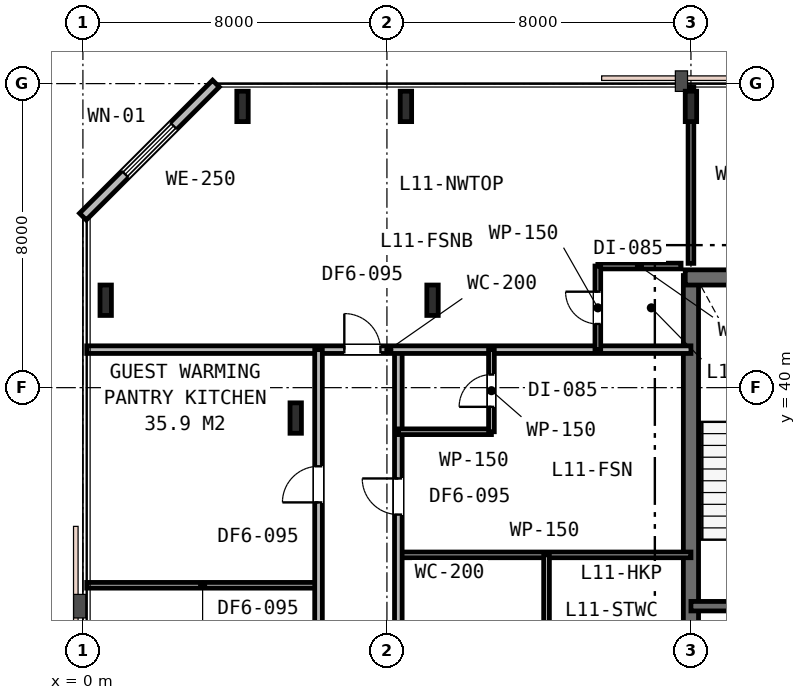
"""IFC4 building model, lengths in metres.
Left out: names, types, materials, properties, quantities, classifications, styles, units other than length and angle.
Written with IfcOpenShell. Run it as: python <this file> out.ifc"""

import sys

from ifc_helpers import new_model, si_unit, direction, frame, frame_2d, origin, origin_2d, place, context, subcontext, project, spatial, rectangle, i_section, extrude, element, fill, save


model = new_model("IFC4")
c1 = context("Model", 3, precision=1e-05, world=origin(), true_north=direction((0.0, 1.0)))
c2 = subcontext(c1, "Body", "Model", "MODEL_VIEW")
j1 = project(units=[si_unit("LENGTHUNIT", "METRE"), si_unit("PLANEANGLEUNIT", "RADIAN")], contexts=[c1])
p1 = place(None, origin())
s1 = spatial("IfcSite", under=j1, at=p1, CompositionType="ELEMENT")
p2 = place(p1, origin())
s2 = spatial("IfcBuilding", under=s1, at=p2, CompositionType="ELEMENT")
p3 = place(p2, frame((0.0, 0.0, 47.4)))
s3 = spatial("IfcBuildingStorey", under=s2, at=p3, CompositionType="ELEMENT", Elevation=47.4)
p4 = place(p3, frame((16.0, 30.65, 0.0), z_axis=(0.0, 0.0, 1.0), x_axis=(0.0, 1.0, 0.0)))
e1 = element("IfcWall", 1, at=p4, inside=s3, PredefinedType="SHEAR", context=c2, shape_type="SweptSolid", body=[
    extrude(rectangle(XDim=12.3, YDim=0.4, at=frame_2d((6.15, 0.0))), origin(), (0.0, 0.0, 1.0), 3.6),
])
p5 = place(p3, frame((15.85, 42.9, 0.0), z_axis=(0.0, 0.0, 1.0), x_axis=(1.0, 0.0, 0.0)))
e2 = element("IfcWall", 2, at=p5, inside=s3, PredefinedType="SHEAR", context=c2, shape_type="SweptSolid", body=[
    extrude(rectangle(XDim=24.3, YDim=0.4, at=frame_2d((12.15, 0.0))), origin(), (0.0, 0.0, 1.0), 3.6),
])
p6 = place(p3, frame((16.0, 34.25, 0.0), z_axis=(0.0, 0.0, 1.0), x_axis=(1.0, 0.0, 0.0)))
e3 = element("IfcWall", 3, at=p6, inside=s3, PredefinedType="SHEAR", context=c2, shape_type="SweptSolid", body=[
    extrude(rectangle(XDim=6.05, YDim=0.25, at=frame_2d((3.025, 0.0))), origin(), (0.0, 0.0, 1.0), 3.6),
])
p7 = place(p6, frame((1.25, 0.0, 0.0)))
e4 = element("IfcOpeningElement", 4, at=p7, cuts=e3, PredefinedType="OPENING", context=c2, shape_type="SweptSolid", body=[
    extrude(rectangle(XDim=1.0, YDim=2.15, at=frame_2d((0.5, 1.075))), frame((0.0, 0.135, 0.0), z_axis=(0.0, -1.0, 0.0), x_axis=(1.0, 0.0, 0.0)), (0.0, 0.0, 1.0), 0.27),
])
p8 = place(p6, frame((4.2, 0.0, 0.0)))
e5 = element("IfcOpeningElement", 5, at=p8, cuts=e3, PredefinedType="OPENING", context=c2, shape_type="SweptSolid", body=[
    extrude(rectangle(XDim=1.1, YDim=2.15, at=frame_2d((0.55, 1.075))), frame((0.0, 0.135, 0.0), z_axis=(0.0, -1.0, 0.0), x_axis=(1.0, 0.0, 0.0)), (0.0, 0.0, 1.0), 0.27),
])
for number, where, z_axis, x_axis in (
    (6, (5.6, 39.2, 0.0), (0.0, 0.0, 1.0), (1.0, 0.0, 0.0)),
    (7, (9.2, 42.3, 0.0), (0.0, 0.0, 1.0), (1.0, 0.0, 0.0)),
    (8, (0.6, 42.3, 0.0), (0.0, 0.0, 1.0), (1.0, 0.0, 0.0)),
    (9, (4.2, 47.4, 0.0), (0.0, 0.0, 1.0), (1.0, 0.0, 0.0)),
    (10, (8.5, 47.4, 0.0), (0.0, 0.0, 1.0), (1.0, 0.0, 0.0)),
    (11, (16.0, 47.4, 0.0), (0.0, 0.0, 1.0), (1.0, 0.0, 0.0)),
):
    element("IfcColumn", number, at=place(p3, frame(where, z_axis=z_axis, x_axis=x_axis)), inside=s3, PredefinedType="COLUMN", context=c2, shape_type="SweptSolid", body=[
        extrude(i_section(OverallWidth=0.3, OverallDepth=0.8, WebThickness=0.018, FlangeThickness=0.033, FilletRadius=0.03, at=origin_2d()), origin(), (0.0, 0.0, 1.0), 3.6),
    ])
p9 = place(p3, frame((3.5, 48.0, 0.0), z_axis=(0.0, 0.0, 1.0), x_axis=(-0.707106781187, -0.707106781187, 0.0)))
e12 = element("IfcWall", 12, at=p9, inside=s3, PredefinedType="STANDARD", context=c2, shape_type="SweptSolid", body=[
    extrude(rectangle(XDim=4.95, YDim=0.25, at=frame_2d((2.475, 0.0))), origin(), (0.0, 0.0, 1.0), 3.33),
])
p10 = place(p9, frame((1.575, 0.0, 0.75)))
e13 = element("IfcOpeningElement", 13, at=p10, cuts=e12, PredefinedType="OPENING", context=c2, shape_type="SweptSolid", body=[
    extrude(rectangle(XDim=1.8, YDim=1.85, at=frame_2d((0.9, 0.925))), frame((0.0, 0.135, 0.0), z_axis=(0.0, -1.0, 0.0), x_axis=(1.0, 0.0, 0.0)), (0.0, 0.0, 1.0), 0.27),
])
p11 = place(p3, frame((8.3, 35.6, 0.0), z_axis=(0.0, 0.0, 1.0), x_axis=(1.0, 0.0, 0.0)))
e14 = element("IfcWall", 14, at=p11, inside=s3, PredefinedType="PARTITIONING", context=c2, shape_type="SweptSolid", body=[
    extrude(rectangle(XDim=7.7, YDim=0.15, at=frame_2d((3.85, 0.0))), origin(), (0.0, 0.0, 1.0), 2.82),
])
p12 = place(p3, frame((12.2, 30.8, 0.0), z_axis=(0.0, 0.0, 1.0), x_axis=(0.0, 1.0, 0.0)))
e15 = element("IfcWall", 15, at=p12, inside=s3, PredefinedType="PARTITIONING", context=c2, shape_type="SweptSolid", body=[
    extrude(rectangle(XDim=4.8, YDim=0.15, at=frame_2d((2.4, 0.0))), origin(), (0.0, 0.0, 1.0), 2.82),
])
p13 = place(p3, frame((8.3, 30.8, 0.0), z_axis=(0.0, 0.0, 1.0), x_axis=(0.0, 1.0, 0.0)))
e16 = element("IfcWall", 16, at=p13, inside=s3, PredefinedType="PARTITIONING", context=c2, shape_type="SweptSolid", body=[
    extrude(rectangle(XDim=10.2, YDim=0.2, at=frame_2d((5.1, 0.0))), origin(), (0.0, 0.0, 1.0), 2.82),
])
p14 = place(p13, frame((1.95, 0.0, 0.0)))
e17 = element("IfcOpeningElement", 17, at=p14, cuts=e16, PredefinedType="OPENING", context=c2, shape_type="SweptSolid", body=[
    extrude(rectangle(XDim=0.9, YDim=2.15, at=frame_2d((0.45, 1.075))), frame((0.0, 0.11, 0.0), z_axis=(0.0, -1.0, 0.0), x_axis=(1.0, 0.0, 0.0)), (0.0, 0.0, 1.0), 0.22),
])
p15 = place(p13, frame((5.861, 0.0, 0.0)))
e18 = element("IfcOpeningElement", 18, at=p15, cuts=e16, PredefinedType="OPENING", context=c2, shape_type="SweptSolid", body=[
    extrude(rectangle(XDim=0.95, YDim=2.15, at=frame_2d((0.475, 1.075))), frame((0.0, 0.11, 0.0), z_axis=(0.0, -1.0, 0.0), x_axis=(1.0, 0.0, 0.0)), (0.0, 0.0, 1.0), 0.22),
])
p16 = place(p3, frame((0.1, 41.0, 0.0), z_axis=(0.0, 0.0, 1.0), x_axis=(1.0, 0.0, 0.0)))
e19 = element("IfcWall", 19, at=p16, inside=s3, PredefinedType="PARTITIONING", context=c2, shape_type="SweptSolid", body=[
    extrude(rectangle(XDim=15.9, YDim=0.2, at=frame_2d((7.95, 0.0))), origin(), (0.0, 0.0, 1.0), 2.82),
])
p17 = place(p16, frame((6.779, 0.0, 0.0)))
e20 = element("IfcOpeningElement", 20, at=p17, cuts=e19, PredefinedType="OPENING", context=c2, shape_type="SweptSolid", body=[
    extrude(rectangle(XDim=0.95, YDim=2.15, at=frame_2d((0.475, 1.075))), frame((0.0, 0.11, 0.0), z_axis=(0.0, -1.0, 0.0), x_axis=(1.0, 0.0, 0.0)), (0.0, 0.0, 1.0), 0.22),
])
p18 = place(p3, frame((13.55, 43.2, 0.0), z_axis=(0.0, 0.0, 1.0), x_axis=(1.0, 0.0, 0.0)))
e21 = element("IfcWall", 21, at=p18, inside=s3, PredefinedType="PARTITIONING", context=c2, shape_type="SweptSolid", body=[
    extrude(rectangle(XDim=2.19, YDim=0.15, at=frame_2d((1.095, 0.0))), origin(), (0.0, 0.0, 1.0), 3.33),
])
p19 = place(p3, frame((13.55, 41.0, 0.0), z_axis=(0.0, 0.0, 1.0), x_axis=(0.0, 1.0, 0.0)))
e22 = element("IfcWall", 22, at=p19, inside=s3, PredefinedType="PARTITIONING", context=c2, shape_type="SweptSolid", body=[
    extrude(rectangle(XDim=2.2, YDim=0.15, at=frame_2d((1.1, 0.0))), origin(), (0.0, 0.0, 1.0), 3.33),
])
p20 = place(p19, frame((0.675, 0.0, 0.0)))
e23 = element("IfcOpeningElement", 23, at=p20, cuts=e22, PredefinedType="OPENING", context=c2, shape_type="SweptSolid", body=[
    extrude(rectangle(XDim=0.85, YDim=2.15, at=frame_2d((0.425, 1.075))), frame((0.0, 0.085, 0.0), z_axis=(0.0, -1.0, 0.0), x_axis=(1.0, 0.0, 0.0)), (0.0, 0.0, 1.0), 0.17),
])
p21 = place(p3, frame((0.1, 34.8, 0.0), z_axis=(0.0, 0.0, 1.0), x_axis=(1.0, 0.0, 0.0)))
e24 = element("IfcWall", 24, at=p21, inside=s3, PredefinedType="PARTITIONING", context=c2, shape_type="SweptSolid", body=[
    extrude(rectangle(XDim=6.1, YDim=0.15, at=frame_2d((3.05, 0.0))), origin(), (0.0, 0.0, 1.0), 2.82),
])
p22 = place(p3, frame((6.2, 28.6, 0.0), z_axis=(0.0, 0.0, 1.0), x_axis=(0.0, 1.0, 0.0)))
e25 = element("IfcWall", 25, at=p22, inside=s3, PredefinedType="PARTITIONING", context=c2, shape_type="SweptSolid", body=[
    extrude(rectangle(XDim=12.4, YDim=0.2, at=frame_2d((6.2, 0.0))), origin(), (0.0, 0.0, 1.0), 2.82),
])
p23 = place(p22, frame((3.725, 0.0, 0.0)))
e26 = element("IfcOpeningElement", 26, at=p23, cuts=e25, PredefinedType="OPENING", context=c2, shape_type="SweptSolid", body=[
    extrude(rectangle(XDim=0.95, YDim=2.15, at=frame_2d((0.475, 1.075))), frame((0.0, 0.11, 0.0), z_axis=(0.0, -1.0, 0.0), x_axis=(1.0, 0.0, 0.0)), (0.0, 0.0, 1.0), 0.22),
])
p24 = place(p22, frame((8.381, 0.0, 0.0)))
e27 = element("IfcOpeningElement", 27, at=p24, cuts=e25, PredefinedType="OPENING", context=c2, shape_type="SweptSolid", body=[
    extrude(rectangle(XDim=0.95, YDim=2.15, at=frame_2d((0.475, 1.075))), frame((0.0, 0.11, 0.0), z_axis=(0.0, -1.0, 0.0), x_axis=(1.0, 0.0, 0.0)), (0.0, 0.0, 1.0), 0.22),
])
p25 = place(p3, frame((8.3, 38.84, 0.0), z_axis=(0.0, 0.0, 1.0), x_axis=(1.0, 0.0, 0.0)))
e28 = element("IfcWall", 28, at=p25, inside=s3, PredefinedType="PARTITIONING", context=c2, shape_type="SweptSolid", body=[
    extrude(rectangle(XDim=2.45, YDim=0.15, at=frame_2d((1.225, 0.0))), origin(), (0.0, 0.0, 1.0), 2.82),
])
p26 = place(p3, frame((10.75, 38.84, 0.0), z_axis=(0.0, 0.0, 1.0), x_axis=(0.0, 1.0, 0.0)))
e29 = element("IfcWall", 29, at=p26, inside=s3, PredefinedType="PARTITIONING", context=c2, shape_type="SweptSolid", body=[
    extrude(rectangle(XDim=2.16, YDim=0.15, at=frame_2d((1.08, 0.0))), origin(), (0.0, 0.0, 1.0), 3.33),
])
p27 = place(p26, frame((0.655, 0.0, 0.0)))
e30 = element("IfcOpeningElement", 30, at=p27, cuts=e29, PredefinedType="OPENING", context=c2, shape_type="SweptSolid", body=[
    extrude(rectangle(XDim=0.85, YDim=2.15, at=frame_2d((0.425, 1.075))), frame((0.0, 0.085, 0.0), z_axis=(0.0, -1.0, 0.0), x_axis=(1.0, 0.0, 0.0)), (0.0, 0.0, 1.0), 0.17),
])
p28 = place(p3, frame((16.0, 43.27, 0.0), z_axis=(0.0, 0.0, 1.0), x_axis=(0.0, 1.0, 0.0)))
e31 = element("IfcWall", 31, at=p28, inside=s3, PredefinedType="PARTITIONING", context=c2, shape_type="SweptSolid", body=[
    extrude(rectangle(XDim=4.63, YDim=0.15, at=frame_2d((2.315, 0.0))), origin(), (0.0, 0.0, 1.0), 2.93),
])
p29 = place(p10, origin())
e32 = element("IfcWindow", 32, at=p29, inside=s3, PartitioningType="SINGLE_PANEL", PredefinedType="WINDOW", context=c2, shape_type="SweptSolid", body=[
    extrude(rectangle(XDim=1.8, YDim=1.85, at=frame_2d((0.9, 0.925))), frame((0.0, 0.03, 0.0), z_axis=(0.0, -1.0, 0.0), x_axis=(1.0, 0.0, 0.0)), (0.0, 0.0, 1.0), 0.06),
])
fill(e13, e32)
p30 = place(p17, origin())
e33 = element("IfcDoor", 33, at=p30, inside=s3, OperationType="SINGLE_SWING_LEFT", PredefinedType="DOOR", context=c2, shape_type="SweptSolid", body=[
    extrude(rectangle(XDim=0.95, YDim=2.15, at=frame_2d((0.475, 1.075))), frame((0.0, 0.025, 0.0), z_axis=(0.0, -1.0, 0.0), x_axis=(1.0, 0.0, 0.0)), (0.0, 0.0, 1.0), 0.05),
])
fill(e20, e33)
p31 = place(p20, origin())
e34 = element("IfcDoor", 34, at=p31, inside=s3, OperationType="SINGLE_SWING_RIGHT", PredefinedType="DOOR", context=c2, shape_type="SweptSolid", body=[
    extrude(rectangle(XDim=0.85, YDim=2.15, at=frame_2d((0.425, 1.075))), frame((0.0, 0.025, 0.0), z_axis=(0.0, -1.0, 0.0), x_axis=(1.0, 0.0, 0.0)), (0.0, 0.0, 1.0), 0.05),
])
fill(e23, e34)
p32 = place(p24, origin())
e35 = element("IfcDoor", 35, at=p32, inside=s3, OperationType="SINGLE_SWING_LEFT", PredefinedType="DOOR", context=c2, shape_type="SweptSolid", body=[
    extrude(rectangle(XDim=0.95, YDim=2.15, at=frame_2d((0.475, 1.075))), frame((0.0, 0.025, 0.0), z_axis=(0.0, -1.0, 0.0), x_axis=(1.0, 0.0, 0.0)), (0.0, 0.0, 1.0), 0.05),
])
fill(e27, e35)
p33 = place(p15, origin())
e36 = element("IfcDoor", 36, at=p33, inside=s3, OperationType="SINGLE_SWING_RIGHT", PredefinedType="DOOR", context=c2, shape_type="SweptSolid", body=[
    extrude(rectangle(XDim=0.95, YDim=2.15, at=frame_2d((0.475, 1.075))), frame((0.0, 0.025, 0.0), z_axis=(0.0, -1.0, 0.0), x_axis=(1.0, 0.0, 0.0)), (0.0, 0.0, 1.0), 0.05),
])
fill(e18, e36)
p34 = place(p27, origin())
e37 = element("IfcDoor", 37, at=p34, inside=s3, OperationType="SINGLE_SWING_LEFT", PredefinedType="DOOR", context=c2, shape_type="SweptSolid", body=[
    extrude(rectangle(XDim=0.85, YDim=2.15, at=frame_2d((0.425, 1.075))), frame((0.0, 0.025, 0.0), z_axis=(0.0, -1.0, 0.0), x_axis=(1.0, 0.0, 0.0)), (0.0, 0.0, 1.0), 0.05),
])
fill(e30, e37)
save(model, sys.argv[1])
